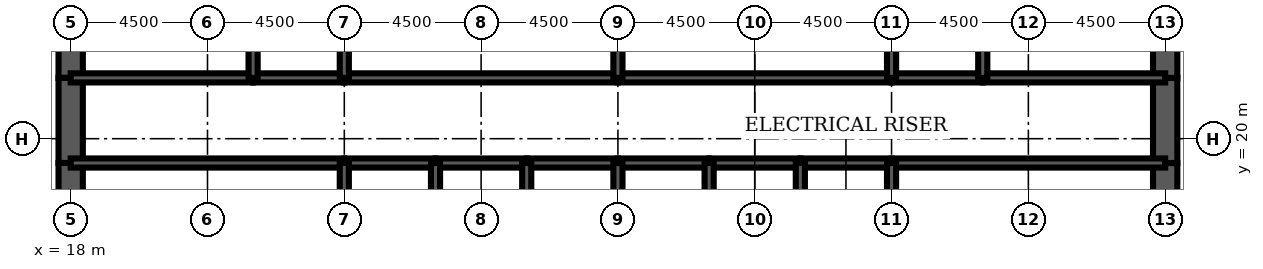
"""IFC4 building model, lengths in metres.
Left out: names, types, materials, properties, quantities, classifications, styles, units other than length and angle.
Written with IfcOpenShell. Run it as: python <this file> out.ifc"""

import sys

from ifc_helpers import new_model, si_unit, direction, frame, frame_2d, origin, place, context, subcontext, project, spatial, rectangle, extrude, element, fill, save


model = new_model("IFC4")
c1 = context("Model", 3, precision=1e-05, world=origin(), true_north=direction((0.0, 1.0)))
c2 = subcontext(c1, "Body", "Model", "MODEL_VIEW")
j1 = project(units=[si_unit("LENGTHUNIT", "METRE"), si_unit("PLANEANGLEUNIT", "RADIAN")], contexts=[c1])
p1 = place(None, origin())
s1 = spatial("IfcSite", under=j1, at=p1, CompositionType="ELEMENT")
p2 = place(p1, origin())
s2 = spatial("IfcBuilding", under=s1, at=p2, CompositionType="ELEMENT")
p3 = place(p2, frame((0.0, 0.0, 240.4)))
s3 = spatial("IfcBuildingStorey", under=s2, at=p3, CompositionType="ELEMENT", Elevation=240.4)
p4 = place(p3, frame((18.0, 26.0, 0.0), z_axis=(0.0, 0.0, 1.0), x_axis=(0.0, -1.0, 0.0)))
e1 = element("IfcWall", 1, at=p4, inside=s3, PredefinedType="SHEAR", context=c2, shape_type="SweptSolid", body=[
    extrude(rectangle(XDim=4.0, YDim=0.8, at=frame_2d((2.0, 0.0))), origin(), (0.0, 0.0, 1.0), 4.2),
])
p5 = place(p3, frame((18.0, 22.0, 0.0), z_axis=(0.0, 0.0, 1.0), x_axis=(0.0, -1.0, 0.0)))
e2 = element("IfcWall", 2, at=p5, inside=s3, PredefinedType="SHEAR", context=c2, shape_type="SweptSolid", body=[
    extrude(rectangle(XDim=2.8, YDim=0.8, at=frame_2d((1.4, 0.0))), origin(), (0.0, 0.0, 1.0), 4.2),
])
p6 = place(p5, frame((0.6, 0.0, 0.0)))
e3 = element("IfcOpeningElement", 3, at=p6, cuts=e2, PredefinedType="OPENING", context=c2, shape_type="SweptSolid", body=[
    extrude(rectangle(XDim=1.8, YDim=2.1, at=frame_2d((0.9, 1.05))), frame((0.0, 0.41, 0.0), z_axis=(0.0, -1.0, 0.0), x_axis=(1.0, 0.0, 0.0)), (0.0, 0.0, 1.0), 0.82),
])
for number, where, z_axis, x_axis in (
    (4, (18.0, 19.2, 0.0), (0.0, 0.0, 1.0), (0.0, -1.0, 0.0)),
    (5, (54.0, 16.0, 0.0), (0.0, 0.0, 1.0), (0.0, 1.0, 0.0)),
):
    element("IfcWall", number, at=place(p3, frame(where, z_axis=z_axis, x_axis=x_axis)), inside=s3, PredefinedType="SHEAR", context=c2, shape_type="SweptSolid", body=[
        extrude(rectangle(XDim=3.2, YDim=0.8, at=frame_2d((1.6, 0.0))), origin(), (0.0, 0.0, 1.0), 4.2),
    ])
p7 = place(p3, frame((54.0, 19.2, 0.0), z_axis=(0.0, 0.0, 1.0), x_axis=(0.0, 1.0, 0.0)))
e6 = element("IfcWall", 6, at=p7, inside=s3, PredefinedType="SHEAR", context=c2, shape_type="SweptSolid", body=[
    extrude(rectangle(XDim=2.8, YDim=0.8, at=frame_2d((1.4, 0.0))), origin(), (0.0, 0.0, 1.0), 4.2),
])
p8 = place(p7, frame((0.4, 0.0, 0.0)))
e7 = element("IfcOpeningElement", 7, at=p8, cuts=e6, PredefinedType="OPENING", context=c2, shape_type="SweptSolid", body=[
    extrude(rectangle(XDim=1.8, YDim=2.1, at=frame_2d((0.9, 1.05))), frame((0.0, 0.41, 0.0), z_axis=(0.0, -1.0, 0.0), x_axis=(1.0, 0.0, 0.0)), (0.0, 0.0, 1.0), 0.82),
])
p9 = place(p3, frame((54.0, 22.0, 0.0), z_axis=(0.0, 0.0, 1.0), x_axis=(0.0, 1.0, 0.0)))
e8 = element("IfcWall", 8, at=p9, inside=s3, PredefinedType="SHEAR", context=c2, shape_type="SweptSolid", body=[
    extrude(rectangle(XDim=4.0, YDim=0.8, at=frame_2d((2.0, 0.0))), origin(), (0.0, 0.0, 1.0), 4.2),
])
p10 = place(p3, frame((18.0, 19.2, 0.0), z_axis=(0.0, 0.0, 1.0), x_axis=(1.0, 0.0, 0.0)))
e9 = element("IfcWall", 9, at=p10, inside=s3, PredefinedType="SOLIDWALL", context=c2, shape_type="SweptSolid", body=[
    extrude(rectangle(XDim=9.0, YDim=0.3, at=frame_2d((4.5, 0.0))), origin(), (0.0, 0.0, 1.0), 4.2),
])
p11 = place(p10, frame((0.65, 0.0, 0.0)))
e10 = element("IfcOpeningElement", 10, at=p11, cuts=e9, PredefinedType="OPENING", context=c2, shape_type="SweptSolid", body=[
    extrude(rectangle(XDim=1.0, YDim=2.1, at=frame_2d((0.5, 1.05))), frame((0.0, 0.16, 0.0), z_axis=(0.0, -1.0, 0.0), x_axis=(1.0, 0.0, 0.0)), (0.0, 0.0, 1.0), 0.32),
])
p12 = place(p3, frame((27.0, 19.2, 0.0), z_axis=(0.0, 0.0, 1.0), x_axis=(1.0, 0.0, 0.0)))
e11 = element("IfcWall", 11, at=p12, inside=s3, PredefinedType="SOLIDWALL", context=c2, shape_type="SweptSolid", body=[
    extrude(rectangle(XDim=3.0, YDim=0.3, at=frame_2d((1.5, 0.0))), origin(), (0.0, 0.0, 1.0), 4.2),
])
p13 = place(p12, frame((0.95, 0.0, 0.0)))
e12 = element("IfcOpeningElement", 12, at=p13, cuts=e11, PredefinedType="OPENING", context=c2, shape_type="SweptSolid", body=[
    extrude(rectangle(XDim=1.1, YDim=2.2, at=frame_2d((0.55, 1.1))), frame((0.0, 0.16, 0.0), z_axis=(0.0, -1.0, 0.0), x_axis=(1.0, 0.0, 0.0)), (0.0, 0.0, 1.0), 0.32),
])
p14 = place(p3, frame((30.0, 19.2, 0.0), z_axis=(0.0, 0.0, 1.0), x_axis=(1.0, 0.0, 0.0)))
e13 = element("IfcWall", 13, at=p14, inside=s3, PredefinedType="SOLIDWALL", context=c2, shape_type="SweptSolid", body=[
    extrude(rectangle(XDim=3.0, YDim=0.3, at=frame_2d((1.5, 0.0))), origin(), (0.0, 0.0, 1.0), 4.2),
])
p15 = place(p14, frame((0.95, 0.0, 0.0)))
e14 = element("IfcOpeningElement", 14, at=p15, cuts=e13, PredefinedType="OPENING", context=c2, shape_type="SweptSolid", body=[
    extrude(rectangle(XDim=1.1, YDim=2.2, at=frame_2d((0.55, 1.1))), frame((0.0, 0.16, 0.0), z_axis=(0.0, -1.0, 0.0), x_axis=(1.0, 0.0, 0.0)), (0.0, 0.0, 1.0), 0.32),
])
p16 = place(p3, frame((33.0, 19.2, 0.0), z_axis=(0.0, 0.0, 1.0), x_axis=(1.0, 0.0, 0.0)))
e15 = element("IfcWall", 15, at=p16, inside=s3, PredefinedType="SOLIDWALL", context=c2, shape_type="SweptSolid", body=[
    extrude(rectangle(XDim=3.0, YDim=0.3, at=frame_2d((1.5, 0.0))), origin(), (0.0, 0.0, 1.0), 4.2),
])
p17 = place(p16, frame((0.95, 0.0, 0.0)))
e16 = element("IfcOpeningElement", 16, at=p17, cuts=e15, PredefinedType="OPENING", context=c2, shape_type="SweptSolid", body=[
    extrude(rectangle(XDim=1.1, YDim=2.2, at=frame_2d((0.55, 1.1))), frame((0.0, 0.16, 0.0), z_axis=(0.0, -1.0, 0.0), x_axis=(1.0, 0.0, 0.0)), (0.0, 0.0, 1.0), 0.32),
])
p18 = place(p3, frame((36.0, 19.2, 0.0), z_axis=(0.0, 0.0, 1.0), x_axis=(1.0, 0.0, 0.0)))
e17 = element("IfcWall", 17, at=p18, inside=s3, PredefinedType="SOLIDWALL", context=c2, shape_type="SweptSolid", body=[
    extrude(rectangle(XDim=3.0, YDim=0.3, at=frame_2d((1.5, 0.0))), origin(), (0.0, 0.0, 1.0), 4.2),
])
p19 = place(p18, frame((0.95, 0.0, 0.0)))
e18 = element("IfcOpeningElement", 18, at=p19, cuts=e17, PredefinedType="OPENING", context=c2, shape_type="SweptSolid", body=[
    extrude(rectangle(XDim=1.1, YDim=2.2, at=frame_2d((0.55, 1.1))), frame((0.0, 0.16, 0.0), z_axis=(0.0, -1.0, 0.0), x_axis=(1.0, 0.0, 0.0)), (0.0, 0.0, 1.0), 0.32),
])
p20 = place(p3, frame((39.0, 19.2, 0.0), z_axis=(0.0, 0.0, 1.0), x_axis=(1.0, 0.0, 0.0)))
e19 = element("IfcWall", 19, at=p20, inside=s3, PredefinedType="SOLIDWALL", context=c2, shape_type="SweptSolid", body=[
    extrude(rectangle(XDim=3.0, YDim=0.3, at=frame_2d((1.5, 0.0))), origin(), (0.0, 0.0, 1.0), 4.2),
])
p21 = place(p20, frame((1.0, 0.0, 0.0)))
e20 = element("IfcOpeningElement", 20, at=p21, cuts=e19, PredefinedType="OPENING", context=c2, shape_type="SweptSolid", body=[
    extrude(rectangle(XDim=1.0, YDim=2.1, at=frame_2d((0.5, 1.05))), frame((0.0, 0.16, 0.0), z_axis=(0.0, -1.0, 0.0), x_axis=(1.0, 0.0, 0.0)), (0.0, 0.0, 1.0), 0.32),
])
p22 = place(p3, frame((42.0, 19.2, 0.0), z_axis=(0.0, 0.0, 1.0), x_axis=(1.0, 0.0, 0.0)))
e21 = element("IfcWall", 21, at=p22, inside=s3, PredefinedType="SOLIDWALL", context=c2, shape_type="SweptSolid", body=[
    extrude(rectangle(XDim=3.0, YDim=0.3, at=frame_2d((1.5, 0.0))), origin(), (0.0, 0.0, 1.0), 4.2),
])
p23 = place(p22, frame((1.0, 0.0, 0.0)))
e22 = element("IfcOpeningElement", 22, at=p23, cuts=e21, PredefinedType="OPENING", context=c2, shape_type="SweptSolid", body=[
    extrude(rectangle(XDim=1.0, YDim=2.1, at=frame_2d((0.5, 1.05))), frame((0.0, 0.16, 0.0), z_axis=(0.0, -1.0, 0.0), x_axis=(1.0, 0.0, 0.0)), (0.0, 0.0, 1.0), 0.32),
])
p24 = place(p3, frame((45.0, 19.2, 0.0), z_axis=(0.0, 0.0, 1.0), x_axis=(1.0, 0.0, 0.0)))
e23 = element("IfcWall", 23, at=p24, inside=s3, PredefinedType="SOLIDWALL", context=c2, shape_type="SweptSolid", body=[
    extrude(rectangle(XDim=9.0, YDim=0.3, at=frame_2d((4.5, 0.0))), origin(), (0.0, 0.0, 1.0), 4.2),
])
p25 = place(p24, frame((7.35, 0.0, 0.0)))
e24 = element("IfcOpeningElement", 24, at=p25, cuts=e23, PredefinedType="OPENING", context=c2, shape_type="SweptSolid", body=[
    extrude(rectangle(XDim=1.0, YDim=2.1, at=frame_2d((0.5, 1.05))), frame((0.0, 0.16, 0.0), z_axis=(0.0, -1.0, 0.0), x_axis=(1.0, 0.0, 0.0)), (0.0, 0.0, 1.0), 0.32),
])
p26 = place(p3, frame((18.0, 22.0, 0.0), z_axis=(0.0, 0.0, 1.0), x_axis=(1.0, 0.0, 0.0)))
e25 = element("IfcWall", 25, at=p26, inside=s3, PredefinedType="SOLIDWALL", context=c2, shape_type="SweptSolid", body=[
    extrude(rectangle(XDim=6.0, YDim=0.3, at=frame_2d((3.0, 0.0))), origin(), (0.0, 0.0, 1.0), 4.2),
])
p27 = place(p26, frame((4.4, 0.0, 0.0)))
e26 = element("IfcOpeningElement", 26, at=p27, cuts=e25, PredefinedType="OPENING", context=c2, shape_type="SweptSolid", body=[
    extrude(rectangle(XDim=1.0, YDim=2.1, at=frame_2d((0.5, 1.05))), frame((0.0, 0.16, 0.0), z_axis=(0.0, -1.0, 0.0), x_axis=(1.0, 0.0, 0.0)), (0.0, 0.0, 1.0), 0.32),
])
p28 = place(p26, frame((0.65, 0.0, 0.0)))
e27 = element("IfcOpeningElement", 27, at=p28, cuts=e25, PredefinedType="OPENING", context=c2, shape_type="SweptSolid", body=[
    extrude(rectangle(XDim=1.0, YDim=2.1, at=frame_2d((0.5, 1.05))), frame((0.0, 0.16, 0.0), z_axis=(0.0, -1.0, 0.0), x_axis=(1.0, 0.0, 0.0)), (0.0, 0.0, 1.0), 0.32),
])
p29 = place(p3, frame((24.0, 22.0, 0.0), z_axis=(0.0, 0.0, 1.0), x_axis=(1.0, 0.0, 0.0)))
e28 = element("IfcWall", 28, at=p29, inside=s3, PredefinedType="SOLIDWALL", context=c2, shape_type="SweptSolid", body=[
    extrude(rectangle(XDim=3.0, YDim=0.3, at=frame_2d((1.5, 0.0))), origin(), (0.0, 0.0, 1.0), 4.2),
])
p30 = place(p29, frame((1.0, 0.0, 0.0)))
e29 = element("IfcOpeningElement", 29, at=p30, cuts=e28, PredefinedType="OPENING", context=c2, shape_type="SweptSolid", body=[
    extrude(rectangle(XDim=1.0, YDim=2.1, at=frame_2d((0.5, 1.05))), frame((0.0, 0.16, 0.0), z_axis=(0.0, -1.0, 0.0), x_axis=(1.0, 0.0, 0.0)), (0.0, 0.0, 1.0), 0.32),
])
p31 = place(p3, frame((27.0, 22.0, 0.0), z_axis=(0.0, 0.0, 1.0), x_axis=(1.0, 0.0, 0.0)))
e30 = element("IfcWall", 30, at=p31, inside=s3, PredefinedType="SOLIDWALL", context=c2, shape_type="SweptSolid", body=[
    extrude(rectangle(XDim=9.0, YDim=0.3, at=frame_2d((4.5, 0.0))), origin(), (0.0, 0.0, 1.0), 4.2),
])
p32 = place(p31, frame((4.0, 0.0, 0.0)))
e31 = element("IfcOpeningElement", 31, at=p32, cuts=e30, PredefinedType="OPENING", context=c2, shape_type="SweptSolid", body=[
    extrude(rectangle(XDim=1.0, YDim=2.1, at=frame_2d((0.5, 1.05))), frame((0.0, 0.16, 0.0), z_axis=(0.0, -1.0, 0.0), x_axis=(1.0, 0.0, 0.0)), (0.0, 0.0, 1.0), 0.32),
])
p33 = place(p3, frame((36.0, 22.0, 0.0), z_axis=(0.0, 0.0, 1.0), x_axis=(1.0, 0.0, 0.0)))
e32 = element("IfcWall", 32, at=p33, inside=s3, PredefinedType="SOLIDWALL", context=c2, shape_type="SweptSolid", body=[
    extrude(rectangle(XDim=9.0, YDim=0.3, at=frame_2d((4.5, 0.0))), origin(), (0.0, 0.0, 1.0), 4.2),
])
p34 = place(p33, frame((4.0, 0.0, 0.0)))
e33 = element("IfcOpeningElement", 33, at=p34, cuts=e32, PredefinedType="OPENING", context=c2, shape_type="SweptSolid", body=[
    extrude(rectangle(XDim=1.0, YDim=2.1, at=frame_2d((0.5, 1.05))), frame((0.0, 0.16, 0.0), z_axis=(0.0, -1.0, 0.0), x_axis=(1.0, 0.0, 0.0)), (0.0, 0.0, 1.0), 0.32),
])
p35 = place(p3, frame((45.0, 22.0, 0.0), z_axis=(0.0, 0.0, 1.0), x_axis=(1.0, 0.0, 0.0)))
e34 = element("IfcWall", 34, at=p35, inside=s3, PredefinedType="SOLIDWALL", context=c2, shape_type="SweptSolid", body=[
    extrude(rectangle(XDim=3.0, YDim=0.3, at=frame_2d((1.5, 0.0))), origin(), (0.0, 0.0, 1.0), 4.2),
])
p36 = place(p35, frame((1.0, 0.0, 0.0)))
e35 = element("IfcOpeningElement", 35, at=p36, cuts=e34, PredefinedType="OPENING", context=c2, shape_type="SweptSolid", body=[
    extrude(rectangle(XDim=1.0, YDim=2.1, at=frame_2d((0.5, 1.05))), frame((0.0, 0.16, 0.0), z_axis=(0.0, -1.0, 0.0), x_axis=(1.0, 0.0, 0.0)), (0.0, 0.0, 1.0), 0.32),
])
p37 = place(p3, frame((48.0, 22.0, 0.0), z_axis=(0.0, 0.0, 1.0), x_axis=(1.0, 0.0, 0.0)))
e36 = element("IfcWall", 36, at=p37, inside=s3, PredefinedType="SOLIDWALL", context=c2, shape_type="SweptSolid", body=[
    extrude(rectangle(XDim=6.0, YDim=0.3, at=frame_2d((3.0, 0.0))), origin(), (0.0, 0.0, 1.0), 4.2),
])
p38 = place(p37, frame((2.0, 0.0, 0.0)))
e37 = element("IfcOpeningElement", 37, at=p38, cuts=e36, PredefinedType="OPENING", context=c2, shape_type="SweptSolid", body=[
    extrude(rectangle(XDim=1.0, YDim=2.1, at=frame_2d((0.5, 1.05))), frame((0.0, 0.16, 0.0), z_axis=(0.0, -1.0, 0.0), x_axis=(1.0, 0.0, 0.0)), (0.0, 0.0, 1.0), 0.32),
])
p39 = place(p37, frame((4.05, 0.0, 0.0)))
e38 = element("IfcOpeningElement", 38, at=p39, cuts=e36, PredefinedType="OPENING", context=c2, shape_type="SweptSolid", body=[
    extrude(rectangle(XDim=1.0, YDim=2.1, at=frame_2d((0.5, 1.05))), frame((0.0, 0.16, 0.0), z_axis=(0.0, -1.0, 0.0), x_axis=(1.0, 0.0, 0.0)), (0.0, 0.0, 1.0), 0.32),
])
for number, where, z_axis, x_axis in (
    (39, (27.0, 16.0, 0.0), (0.0, 0.0, 1.0), (0.0, 1.0, 0.0)),
    (40, (30.0, 16.0, 0.0), (0.0, 0.0, 1.0), (0.0, 1.0, 0.0)),
    (41, (33.0, 16.0, 0.0), (0.0, 0.0, 1.0), (0.0, 1.0, 0.0)),
    (42, (36.0, 16.0, 0.0), (0.0, 0.0, 1.0), (0.0, 1.0, 0.0)),
    (43, (39.0, 16.0, 0.0), (0.0, 0.0, 1.0), (0.0, 1.0, 0.0)),
    (44, (42.0, 16.0, 0.0), (0.0, 0.0, 1.0), (0.0, 1.0, 0.0)),
    (45, (45.0, 16.0, 0.0), (0.0, 0.0, 1.0), (0.0, 1.0, 0.0)),
):
    element("IfcWall", number, at=place(p3, frame(where, z_axis=z_axis, x_axis=x_axis)), inside=s3, PredefinedType="SOLIDWALL", context=c2, shape_type="SweptSolid", body=[
        extrude(rectangle(XDim=3.2, YDim=0.3, at=frame_2d((1.6, 0.0))), origin(), (0.0, 0.0, 1.0), 4.2),
    ])
for number, where, z_axis, x_axis in (
    (46, (24.0, 22.0, 0.0), (0.0, 0.0, 1.0), (0.0, 1.0, 0.0)),
    (47, (27.0, 22.0, 0.0), (0.0, 0.0, 1.0), (0.0, 1.0, 0.0)),
    (48, (36.0, 22.0, 0.0), (0.0, 0.0, 1.0), (0.0, 1.0, 0.0)),
    (49, (45.0, 22.0, 0.0), (0.0, 0.0, 1.0), (0.0, 1.0, 0.0)),
    (50, (48.0, 22.0, 0.0), (0.0, 0.0, 1.0), (0.0, 1.0, 0.0)),
):
    element("IfcWall", number, at=place(p3, frame(where, z_axis=z_axis, x_axis=x_axis)), inside=s3, PredefinedType="SOLIDWALL", context=c2, shape_type="SweptSolid", body=[
        extrude(rectangle(XDim=4.0, YDim=0.3, at=frame_2d((2.0, 0.0))), origin(), (0.0, 0.0, 1.0), 4.2),
    ])
p40 = place(p3, frame((39.0, 22.15, 0.0), z_axis=(0.0, 0.0, 1.0), x_axis=(0.0, 1.0, 0.0)))
e51 = element("IfcWall", 51, at=p40, inside=s3, PredefinedType="PARTITIONING", context=c2, shape_type="SweptSolid", body=[
    extrude(rectangle(XDim=3.7, YDim=0.15, at=frame_2d((1.85, 0.0))), origin(), (0.0, 0.0, 1.0), 3.0),
])
p41 = place(p40, frame((2.2, 0.0, 0.0)))
e52 = element("IfcOpeningElement", 52, at=p41, cuts=e51, PredefinedType="OPENING", context=c2, shape_type="SweptSolid", body=[
    extrude(rectangle(XDim=1.0, YDim=2.1, at=frame_2d((0.5, 1.05))), frame((0.0, 0.085, 0.0), z_axis=(0.0, -1.0, 0.0), x_axis=(1.0, 0.0, 0.0)), (0.0, 0.0, 1.0), 0.17),
])
for number, where, z_axis, x_axis in (
    (53, (19.975, 22.15, 0.0), (0.0, 0.0, 1.0), (0.0, 1.0, 0.0)),
    (54, (51.425, 22.15, 0.0), (0.0, 0.0, 1.0), (0.0, 1.0, 0.0)),
):
    element("IfcWall", number, at=place(p3, frame(where, z_axis=z_axis, x_axis=x_axis)), inside=s3, PredefinedType="PARTITIONING", context=c2, shape_type="SweptSolid", body=[
        extrude(rectangle(XDim=3.7, YDim=0.15, at=frame_2d((1.85, 0.0))), origin(), (0.0, 0.0, 1.0), 3.0),
    ])
p42 = place(p13, origin())
e55 = element("IfcDoor", 55, at=p42, inside=s3, OperationType="DOUBLE_DOOR_SLIDING", PredefinedType="USERDEFINED", context=c2, shape_type="SweptSolid", body=[
    extrude(rectangle(XDim=1.1, YDim=2.2, at=frame_2d((0.55, 1.1))), frame((0.0, 0.025, 0.0), z_axis=(0.0, -1.0, 0.0), x_axis=(1.0, 0.0, 0.0)), (0.0, 0.0, 1.0), 0.05),
])
fill(e12, e55)
p43 = place(p15, origin())
e56 = element("IfcDoor", 56, at=p43, inside=s3, OperationType="DOUBLE_DOOR_SLIDING", PredefinedType="USERDEFINED", context=c2, shape_type="SweptSolid", body=[
    extrude(rectangle(XDim=1.1, YDim=2.2, at=frame_2d((0.55, 1.1))), frame((0.0, 0.025, 0.0), z_axis=(0.0, -1.0, 0.0), x_axis=(1.0, 0.0, 0.0)), (0.0, 0.0, 1.0), 0.05),
])
fill(e14, e56)
p44 = place(p17, origin())
e57 = element("IfcDoor", 57, at=p44, inside=s3, OperationType="DOUBLE_DOOR_SLIDING", PredefinedType="USERDEFINED", context=c2, shape_type="SweptSolid", body=[
    extrude(rectangle(XDim=1.1, YDim=2.2, at=frame_2d((0.55, 1.1))), frame((0.0, 0.025, 0.0), z_axis=(0.0, -1.0, 0.0), x_axis=(1.0, 0.0, 0.0)), (0.0, 0.0, 1.0), 0.05),
])
fill(e16, e57)
p45 = place(p19, origin())
e58 = element("IfcDoor", 58, at=p45, inside=s3, OperationType="DOUBLE_DOOR_SLIDING", PredefinedType="USERDEFINED", context=c2, shape_type="SweptSolid", body=[
    extrude(rectangle(XDim=1.1, YDim=2.2, at=frame_2d((0.55, 1.1))), frame((0.0, 0.025, 0.0), z_axis=(0.0, -1.0, 0.0), x_axis=(1.0, 0.0, 0.0)), (0.0, 0.0, 1.0), 0.05),
])
fill(e18, e58)
p46 = place(p11, origin())
e59 = element("IfcDoor", 59, at=p46, inside=s3, OperationType="SINGLE_SWING_LEFT", PredefinedType="DOOR", context=c2, shape_type="SweptSolid", body=[
    extrude(rectangle(XDim=1.0, YDim=2.1, at=frame_2d((0.5, 1.05))), frame((0.0, 0.025, 0.0), z_axis=(0.0, -1.0, 0.0), x_axis=(1.0, 0.0, 0.0)), (0.0, 0.0, 1.0), 0.05),
])
fill(e10, e59)
p47 = place(p25, origin())
e60 = element("IfcDoor", 60, at=p47, inside=s3, OperationType="SINGLE_SWING_RIGHT", PredefinedType="DOOR", context=c2, shape_type="SweptSolid", body=[
    extrude(rectangle(XDim=1.0, YDim=2.1, at=frame_2d((0.5, 1.05))), frame((0.0, 0.025, 0.0), z_axis=(0.0, -1.0, 0.0), x_axis=(1.0, 0.0, 0.0)), (0.0, 0.0, 1.0), 0.05),
])
fill(e24, e60)
p48 = place(p6, origin())
e61 = element("IfcDoor", 61, at=p48, inside=s3, OperationType="SINGLE_SWING_LEFT", PredefinedType="DOOR", context=c2, shape_type="SweptSolid", body=[
    extrude(rectangle(XDim=1.8, YDim=2.1, at=frame_2d((0.9, 1.05))), frame((0.0, 0.4, 0.0), z_axis=(0.0, -1.0, 0.0), x_axis=(1.0, 0.0, 0.0)), (0.0, 0.0, 1.0), 0.8),
])
fill(e3, e61)
p49 = place(p8, origin())
e62 = element("IfcDoor", 62, at=p49, inside=s3, OperationType="SINGLE_SWING_LEFT", PredefinedType="DOOR", context=c2, shape_type="SweptSolid", body=[
    extrude(rectangle(XDim=1.8, YDim=2.1, at=frame_2d((0.9, 1.05))), frame((0.0, 0.4, 0.0), z_axis=(0.0, -1.0, 0.0), x_axis=(1.0, 0.0, 0.0)), (0.0, 0.0, 1.0), 0.8),
])
fill(e7, e62)
p50 = place(p27, origin())
e63 = element("IfcDoor", 63, at=p50, inside=s3, OperationType="SINGLE_SWING_RIGHT", PredefinedType="DOOR", context=c2, shape_type="SweptSolid", body=[
    extrude(rectangle(XDim=1.0, YDim=2.1, at=frame_2d((0.5, 1.05))), frame((0.0, 0.025, 0.0), z_axis=(0.0, -1.0, 0.0), x_axis=(1.0, 0.0, 0.0)), (0.0, 0.0, 1.0), 0.05),
])
fill(e26, e63)
p51 = place(p30, origin())
e64 = element("IfcDoor", 64, at=p51, inside=s3, OperationType="SINGLE_SWING_LEFT", PredefinedType="DOOR", context=c2, shape_type="SweptSolid", body=[
    extrude(rectangle(XDim=1.0, YDim=2.1, at=frame_2d((0.5, 1.05))), frame((0.0, 0.025, 0.0), z_axis=(0.0, -1.0, 0.0), x_axis=(1.0, 0.0, 0.0)), (0.0, 0.0, 1.0), 0.05),
])
fill(e29, e64)
p52 = place(p32, origin())
e65 = element("IfcDoor", 65, at=p52, inside=s3, OperationType="SINGLE_SWING_LEFT", PredefinedType="DOOR", context=c2, shape_type="SweptSolid", body=[
    extrude(rectangle(XDim=1.0, YDim=2.1, at=frame_2d((0.5, 1.05))), frame((0.0, 0.025, 0.0), z_axis=(0.0, -1.0, 0.0), x_axis=(1.0, 0.0, 0.0)), (0.0, 0.0, 1.0), 0.05),
])
fill(e31, e65)
p53 = place(p34, origin())
e66 = element("IfcDoor", 66, at=p53, inside=s3, OperationType="SINGLE_SWING_LEFT", PredefinedType="DOOR", context=c2, shape_type="SweptSolid", body=[
    extrude(rectangle(XDim=1.0, YDim=2.1, at=frame_2d((0.5, 1.05))), frame((0.0, 0.025, 0.0), z_axis=(0.0, -1.0, 0.0), x_axis=(1.0, 0.0, 0.0)), (0.0, 0.0, 1.0), 0.05),
])
fill(e33, e66)
p54 = place(p36, origin())
e67 = element("IfcDoor", 67, at=p54, inside=s3, OperationType="SINGLE_SWING_LEFT", PredefinedType="DOOR", context=c2, shape_type="SweptSolid", body=[
    extrude(rectangle(XDim=1.0, YDim=2.1, at=frame_2d((0.5, 1.05))), frame((0.0, 0.025, 0.0), z_axis=(0.0, -1.0, 0.0), x_axis=(1.0, 0.0, 0.0)), (0.0, 0.0, 1.0), 0.05),
])
fill(e35, e67)
p55 = place(p38, origin())
e68 = element("IfcDoor", 68, at=p55, inside=s3, OperationType="SINGLE_SWING_LEFT", PredefinedType="DOOR", context=c2, shape_type="SweptSolid", body=[
    extrude(rectangle(XDim=1.0, YDim=2.1, at=frame_2d((0.5, 1.05))), frame((0.0, 0.025, 0.0), z_axis=(0.0, -1.0, 0.0), x_axis=(1.0, 0.0, 0.0)), (0.0, 0.0, 1.0), 0.05),
])
fill(e37, e68)
p56 = place(p28, origin())
e69 = element("IfcDoor", 69, at=p56, inside=s3, OperationType="SINGLE_SWING_LEFT", PredefinedType="DOOR", context=c2, shape_type="SweptSolid", body=[
    extrude(rectangle(XDim=1.0, YDim=2.1, at=frame_2d((0.5, 1.05))), frame((0.0, 0.025, 0.0), z_axis=(0.0, -1.0, 0.0), x_axis=(1.0, 0.0, 0.0)), (0.0, 0.0, 1.0), 0.05),
])
fill(e27, e69)
p57 = place(p39, origin())
e70 = element("IfcDoor", 70, at=p57, inside=s3, OperationType="SINGLE_SWING_RIGHT", PredefinedType="DOOR", context=c2, shape_type="SweptSolid", body=[
    extrude(rectangle(XDim=1.0, YDim=2.1, at=frame_2d((0.5, 1.05))), frame((0.0, 0.025, 0.0), z_axis=(0.0, -1.0, 0.0), x_axis=(1.0, 0.0, 0.0)), (0.0, 0.0, 1.0), 0.05),
])
fill(e38, e70)
p58 = place(p21, origin())
e71 = element("IfcDoor", 71, at=p58, inside=s3, OperationType="SINGLE_SWING_LEFT", PredefinedType="DOOR", context=c2, shape_type="SweptSolid", body=[
    extrude(rectangle(XDim=1.0, YDim=2.1, at=frame_2d((0.5, 1.05))), frame((0.0, 0.025, 0.0), z_axis=(0.0, -1.0, 0.0), x_axis=(1.0, 0.0, 0.0)), (0.0, 0.0, 1.0), 0.05),
])
fill(e20, e71)
p59 = place(p23, origin())
e72 = element("IfcDoor", 72, at=p59, inside=s3, OperationType="SINGLE_SWING_LEFT", PredefinedType="DOOR", context=c2, shape_type="SweptSolid", body=[
    extrude(rectangle(XDim=1.0, YDim=2.1, at=frame_2d((0.5, 1.05))), frame((0.0, 0.025, 0.0), z_axis=(0.0, -1.0, 0.0), x_axis=(1.0, 0.0, 0.0)), (0.0, 0.0, 1.0), 0.05),
])
fill(e22, e72)
save(model, sys.argv[1])
